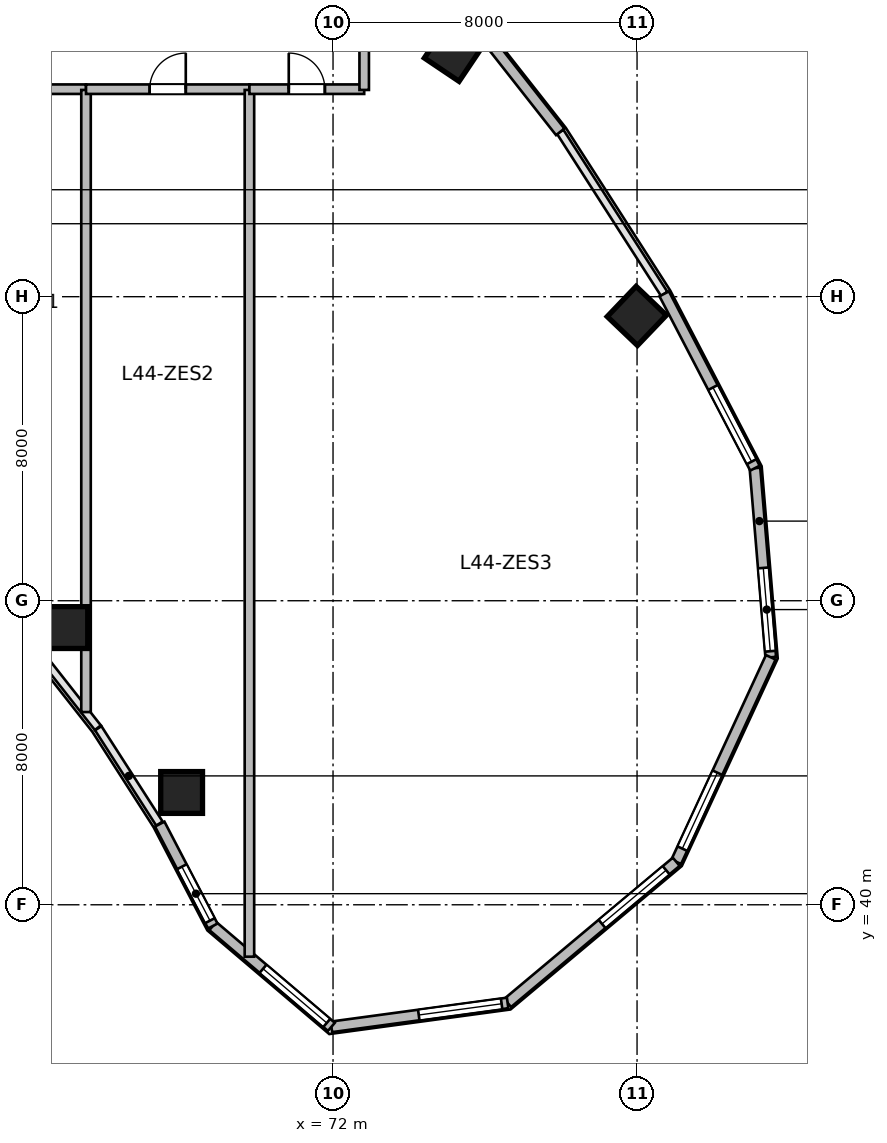
"""IFC4 building model, lengths in metres.
Left out: names, types, materials, properties, quantities, classifications, styles, units other than length and angle.
Written with IfcOpenShell. Run it as: python <this file> out.ifc"""

import sys

from ifc_helpers import new_model, si_unit, direction, frame, frame_2d, origin, origin_2d, place, context, subcontext, project, spatial, rectangle, circle, extrude, source, transform, mapped, element, fill, save


model = new_model("IFC4")
c1 = context("Model", 3, precision=1e-05, world=origin(), true_north=direction((0.0, 1.0)))
c2 = subcontext(c1, "Body", "Model", "MODEL_VIEW")
j1 = project(units=[si_unit("LENGTHUNIT", "METRE"), si_unit("PLANEANGLEUNIT", "RADIAN")], contexts=[c1])
p1 = place(None, origin())
s1 = spatial("IfcSite", under=j1, at=p1, CompositionType="ELEMENT")
p2 = place(p1, origin())
s2 = spatial("IfcBuilding", under=s1, at=p2, CompositionType="ELEMENT")
p3 = place(p2, frame((0.0, 0.0, 181.8)))
s3 = spatial("IfcBuildingStorey", under=s2, at=p3, CompositionType="ELEMENT", Elevation=181.8)
m1 = source(origin(), c2, "Body", "SweptSolid", [
    extrude(circle(Radius=0.55, at=origin_2d()), origin(), (0.0, 0.0, 1.0), 3.9),
])
p4 = place(p3, frame((64.996, 47.294, 0.0), z_axis=(0.0, 0.0, 1.0), x_axis=(0.55774510898, 0.830012285095, 0.0)))
e1 = element("IfcColumn", 1, at=p4, inside=s3, PredefinedType="COLUMN", context=c2, shape_type="MappedRepresentation", body=[
    mapped(m1, transform((0.0, 0.0, 0.0), scale=1.0)),
])
m2 = source(origin(), c2, "Body", "SweptSolid", [
    extrude(rectangle(XDim=1.1, YDim=1.1, at=origin_2d()), origin(), (0.0, 0.0, 1.0), 3.9),
])
p5 = place(p3, frame((75.167, 62.43, 0.0), z_axis=(0.0, 0.0, 1.0), x_axis=(0.55774510898, 0.830012285095, 0.0)))
e2 = element("IfcColumn", 2, at=p5, inside=s3, PredefinedType="COLUMN", context=c2, shape_type="MappedRepresentation", body=[
    mapped(m2, transform((0.0, 0.0, 0.0), scale=1.0)),
])
p6 = place(p3, frame((68.015, 42.955, 0.0), z_axis=(0.0, 0.0, 1.0), x_axis=(0.690756218984, 0.723087716626, 0.0)))
e3 = element("IfcColumn", 3, at=p6, inside=s3, PredefinedType="COLUMN", context=c2, shape_type="MappedRepresentation", body=[
    mapped(m1, transform((0.0, 0.0, 0.0), scale=1.0)),
])
p7 = place(p3, frame((79.993, 55.494, 0.0), z_axis=(0.0, 0.0, 1.0), x_axis=(0.690756218984, 0.723087716626, 0.0)))
e4 = element("IfcColumn", 4, at=p7, inside=s3, PredefinedType="COLUMN", context=c2, shape_type="MappedRepresentation", body=[
    mapped(m2, transform((0.0, 0.0, 0.0), scale=1.0)),
])
m3 = source(origin(), c2, "Body", "SweptSolid", [
    extrude(rectangle(XDim=4.994, YDim=0.28, at=frame_2d((2.497, 0.0))), origin(), (0.0, 0.0, 1.0), 3.65),
])
p8 = place(p3, frame((83.102, 51.489, 0.0), z_axis=(0.0, 0.0, 1.0), x_axis=(0.083344839916, -0.996520766296, 0.0)))
e5 = element("IfcWall", 5, at=p8, inside=s3, PredefinedType="SOLIDWALL", context=c2, shape_type="MappedRepresentation", body=[
    mapped(m3, transform((0.0, 0.0, 0.0), scale=1.0)),
])
p9 = place(p8, frame((2.635, 0.0, 0.95)))
e6 = element("IfcOpeningElement", 6, at=p9, cuts=e5, PredefinedType="OPENING", context=c2, shape_type="SweptSolid", body=[
    extrude(rectangle(XDim=2.2, YDim=2.1, at=frame_2d((1.1, 1.05))), frame((0.0, 0.15, 0.0), z_axis=(0.0, -1.0, 0.0), x_axis=(1.0, 0.0, 0.0)), (0.0, 0.0, 1.0), 0.3),
])
m4 = source(origin(), c2, "Body", "SweptSolid", [
    extrude(rectangle(XDim=5.927, YDim=0.28, at=frame_2d((2.964, 0.0))), origin(), (0.0, 0.0, 1.0), 3.65),
])
p10 = place(p3, frame((83.519, 46.512, 0.0), z_axis=(0.0, 0.0, 1.0), x_axis=(-0.419656204795, -0.907683132914, 0.0)))
e7 = element("IfcWall", 7, at=p10, inside=s3, PredefinedType="SOLIDWALL", context=c2, shape_type="MappedRepresentation", body=[
    mapped(m4, transform((0.0, 0.0, 0.0), scale=1.0)),
])
p11 = place(p10, frame((3.346, 0.0, 0.95)))
e8 = element("IfcOpeningElement", 8, at=p11, cuts=e7, PredefinedType="OPENING", context=c2, shape_type="SweptSolid", body=[
    extrude(rectangle(XDim=2.2, YDim=2.1, at=frame_2d((1.1, 1.05))), frame((0.0, 0.15, 0.0), z_axis=(0.0, -1.0, 0.0), x_axis=(1.0, 0.0, 0.0)), (0.0, 0.0, 1.0), 0.3),
])
m5 = source(origin(), c2, "Body", "SweptSolid", [
    extrude(rectangle(XDim=5.786, YDim=0.28, at=frame_2d((2.893, 0.0))), origin(), (0.0, 0.0, 1.0), 3.65),
])
p12 = place(p3, frame((81.031, 41.131, 0.0), z_axis=(0.0, 0.0, 1.0), x_axis=(-0.766711306852, -0.641992034176, 0.0)))
e9 = element("IfcWall", 9, at=p12, inside=s3, PredefinedType="SOLIDWALL", context=c2, shape_type="MappedRepresentation", body=[
    mapped(m5, transform((0.0, 0.0, 0.0), scale=1.0)),
])
p13 = place(p12, frame((0.347, 0.0, 0.95)))
e10 = element("IfcOpeningElement", 10, at=p13, cuts=e9, PredefinedType="OPENING", context=c2, shape_type="SweptSolid", body=[
    extrude(rectangle(XDim=2.2, YDim=2.1, at=frame_2d((1.1, 1.05))), frame((0.0, 0.15, 0.0), z_axis=(0.0, -1.0, 0.0), x_axis=(1.0, 0.0, 0.0)), (0.0, 0.0, 1.0), 0.3),
])
m6 = source(origin(), c2, "Body", "SweptSolid", [
    extrude(rectangle(XDim=4.68, YDim=0.28, at=frame_2d((2.34, 0.0))), origin(), (0.0, 0.0, 1.0), 3.65),
])
p14 = place(p3, frame((76.594, 37.417, 0.0), z_axis=(0.0, 0.0, 1.0), x_axis=(-0.990931146435, -0.134370618162, 0.0)))
e11 = element("IfcWall", 11, at=p14, inside=s3, PredefinedType="SOLIDWALL", context=c2, shape_type="MappedRepresentation", body=[
    mapped(m6, transform((0.0, 0.0, 0.0), scale=1.0)),
])
p15 = place(p14, frame((0.16, 0.0, 0.95)))
e12 = element("IfcOpeningElement", 12, at=p15, cuts=e11, PredefinedType="OPENING", context=c2, shape_type="SweptSolid", body=[
    extrude(rectangle(XDim=2.2, YDim=2.1, at=frame_2d((1.1, 1.05))), frame((0.0, 0.15, 0.0), z_axis=(0.0, -1.0, 0.0), x_axis=(1.0, 0.0, 0.0)), (0.0, 0.0, 1.0), 0.3),
])
m7 = source(origin(), c2, "Body", "SweptSolid", [
    extrude(rectangle(XDim=4.096, YDim=0.28, at=frame_2d((2.048, 0.0))), origin(), (0.0, 0.0, 1.0), 3.65),
])
p16 = place(p3, frame((71.957, 36.788, 0.0), z_axis=(0.0, 0.0, 1.0), x_axis=(-0.761926081737, 0.647663991564, 0.0)))
e13 = element("IfcWall", 13, at=p16, inside=s3, PredefinedType="SOLIDWALL", context=c2, shape_type="MappedRepresentation", body=[
    mapped(m7, transform((0.0, 0.0, 0.0), scale=1.0)),
])
p17 = place(p16, frame((0.16, 0.0, 0.95)))
e14 = element("IfcOpeningElement", 14, at=p17, cuts=e13, PredefinedType="OPENING", context=c2, shape_type="SweptSolid", body=[
    extrude(rectangle(XDim=2.2, YDim=2.1, at=frame_2d((1.1, 1.05))), frame((0.0, 0.15, 0.0), z_axis=(0.0, -1.0, 0.0), x_axis=(1.0, 0.0, 0.0)), (0.0, 0.0, 1.0), 0.3),
])
m8 = source(origin(), c2, "Body", "SweptSolid", [
    extrude(rectangle(XDim=3.024, YDim=0.28, at=frame_2d((1.512, 0.0))), origin(), (0.0, 0.0, 1.0), 3.65),
])
p18 = place(p3, frame((68.836, 39.44, 0.0), z_axis=(0.0, 0.0, 1.0), x_axis=(-0.461718746531, 0.887026380161, 0.0)))
e15 = element("IfcWall", 15, at=p18, inside=s3, PredefinedType="SOLIDWALL", context=c2, shape_type="MappedRepresentation", body=[
    mapped(m8, transform((0.0, 0.0, 0.0), scale=1.0)),
])
p19 = place(p18, frame((0.16, 0.0, 0.95)))
e16 = element("IfcOpeningElement", 16, at=p19, cuts=e15, PredefinedType="OPENING", context=c2, shape_type="SweptSolid", body=[
    extrude(rectangle(XDim=1.6, YDim=1.9, at=frame_2d((0.8, 0.95))), frame((0.0, 0.15, 0.0), z_axis=(0.0, -1.0, 0.0), x_axis=(1.0, 0.0, 0.0)), (0.0, 0.0, 1.0), 0.3),
])
m9 = source(origin(), c2, "Body", "SweptSolid", [
    extrude(rectangle(XDim=4.922, YDim=0.28, at=frame_2d((2.461, 0.0))), origin(), (0.0, 0.0, 1.0), 3.65),
])
p20 = place(p3, frame((74.936, 64.206, 0.0), z_axis=(0.0, 0.0, 1.0), x_axis=(0.61817639101, -0.786039407153, 0.0)))
e17 = element("IfcWall", 17, at=p20, inside=s3, PredefinedType="SOLIDWALL", context=c2, shape_type="MappedRepresentation", body=[
    mapped(m9, transform((0.0, 0.0, 0.0), scale=1.0)),
])
m10 = source(origin(), c2, "Body", "SweptSolid", [
    extrude(rectangle(XDim=5.171, YDim=0.28, at=frame_2d((2.585, 0.0))), origin(), (0.0, 0.0, 1.0), 3.65),
])
p21 = place(p3, frame((80.715, 56.075, 0.0), z_axis=(0.0, 0.0, 1.0), x_axis=(0.461752581363, -0.887008767491, 0.0)))
e18 = element("IfcWall", 18, at=p21, inside=s3, PredefinedType="SOLIDWALL", context=c2, shape_type="MappedRepresentation", body=[
    mapped(m10, transform((0.0, 0.0, 0.0), scale=1.0)),
])
p22 = place(p21, frame((2.778, 0.0, 0.95)))
e19 = element("IfcOpeningElement", 19, at=p22, cuts=e18, PredefinedType="OPENING", context=c2, shape_type="SweptSolid", body=[
    extrude(rectangle(XDim=2.2, YDim=2.1, at=frame_2d((1.1, 1.05))), frame((0.0, 0.15, 0.0), z_axis=(0.0, -1.0, 0.0), x_axis=(1.0, 0.0, 0.0)), (0.0, 0.0, 1.0), 0.3),
])
m11 = source(origin(), c2, "Body", "SweptSolid", [
    extrude(rectangle(XDim=3.9, YDim=0.25, at=frame_2d((1.95, 0.0))), origin(), (0.0, 0.0, 1.0), 3.65),
])
p23 = place(p3, frame((61.6, 61.46, 0.0), z_axis=(0.0, 0.0, 1.0), x_axis=(1.0, 0.0, 0.0)))
e20 = element("IfcWall", 20, at=p23, inside=s3, PredefinedType="PARTITIONING", context=c2, shape_type="MappedRepresentation", body=[
    mapped(m11, transform((0.0, 0.0, 0.0), scale=1.0)),
])
p24 = place(p23, frame((1.475, 0.0, 0.0)))
e21 = element("IfcOpeningElement", 21, at=p24, cuts=e20, PredefinedType="OPENING", context=c2, shape_type="SweptSolid", body=[
    extrude(rectangle(XDim=0.95, YDim=2.1, at=frame_2d((0.475, 1.05))), frame((0.0, 0.135, 0.0), z_axis=(0.0, -1.0, 0.0), x_axis=(1.0, 0.0, 0.0)), (0.0, 0.0, 1.0), 0.27),
])
m12 = source(origin(), c2, "Body", "SweptSolid", [
    extrude(rectangle(XDim=16.369, YDim=0.25, at=frame_2d((8.185, 0.0))), origin(), (0.0, 0.0, 1.0), 2.942),
])
p25 = place(p3, frame((65.5, 45.071, 0.0), z_axis=(0.0, 0.0, 1.0), x_axis=(0.0, 1.0, 0.0)))
e22 = element("IfcWall", 22, at=p25, inside=s3, PredefinedType="PARTITIONING", context=c2, shape_type="MappedRepresentation", body=[
    mapped(m12, transform((0.0, 0.0, 0.0), scale=1.0)),
])
m13 = source(origin(), c2, "Body", "SweptSolid", [
    extrude(rectangle(XDim=4.3, YDim=0.25, at=frame_2d((2.15, 0.0))), origin(), (0.0, 0.0, 1.0), 3.65),
])
p26 = place(p3, frame((65.5, 61.46, 0.0), z_axis=(0.0, 0.0, 1.0), x_axis=(1.0, 0.0, 0.0)))
e23 = element("IfcWall", 23, at=p26, inside=s3, PredefinedType="PARTITIONING", context=c2, shape_type="MappedRepresentation", body=[
    mapped(m13, transform((0.0, 0.0, 0.0), scale=1.0)),
])
p27 = place(p26, frame((1.675, 0.0, 0.0)))
e24 = element("IfcOpeningElement", 24, at=p27, cuts=e23, PredefinedType="OPENING", context=c2, shape_type="SweptSolid", body=[
    extrude(rectangle(XDim=0.95, YDim=2.1, at=frame_2d((0.475, 1.05))), frame((0.0, 0.135, 0.0), z_axis=(0.0, -1.0, 0.0), x_axis=(1.0, 0.0, 0.0)), (0.0, 0.0, 1.0), 0.27),
])
m14 = source(origin(), c2, "Body", "SweptSolid", [
    extrude(rectangle(XDim=22.806, YDim=0.25, at=frame_2d((11.403, 0.0))), origin(), (0.0, 0.0, 1.0), 2.942),
])
p28 = place(p3, frame((69.8, 38.634, 0.0), z_axis=(0.0, 0.0, 1.0), x_axis=(0.0, 1.0, 0.0)))
e25 = element("IfcWall", 25, at=p28, inside=s3, PredefinedType="PARTITIONING", context=c2, shape_type="MappedRepresentation", body=[
    mapped(m14, transform((0.0, 0.0, 0.0), scale=1.0)),
])
m15 = source(origin(), c2, "Body", "SweptSolid", [
    extrude(rectangle(XDim=3.02, YDim=0.25, at=frame_2d((1.51, 0.0))), origin(), (0.0, 0.0, 1.0), 3.65),
])
p29 = place(p3, frame((69.8, 61.46, 0.0), z_axis=(0.0, 0.0, 1.0), x_axis=(1.0, 0.0, 0.0)))
e26 = element("IfcWall", 26, at=p29, inside=s3, PredefinedType="PARTITIONING", context=c2, shape_type="MappedRepresentation", body=[
    mapped(m15, transform((0.0, 0.0, 0.0), scale=1.0)),
])
p30 = place(p29, frame((1.035, 0.0, 0.0)))
e27 = element("IfcOpeningElement", 27, at=p30, cuts=e26, PredefinedType="OPENING", context=c2, shape_type="SweptSolid", body=[
    extrude(rectangle(XDim=0.95, YDim=2.1, at=frame_2d((0.475, 1.05))), frame((0.0, 0.135, 0.0), z_axis=(0.0, -1.0, 0.0), x_axis=(1.0, 0.0, 0.0)), (0.0, 0.0, 1.0), 0.27),
])
m16 = source(origin(), c2, "Body", "SweptSolid", [
    extrude(rectangle(XDim=2.62, YDim=0.25, at=frame_2d((1.31, 0.0))), origin(), (0.0, 0.0, 1.0), 3.093),
])
p31 = place(p3, frame((72.82, 61.44, 0.0), z_axis=(0.0, 0.0, 1.0), x_axis=(0.0, 1.0, 0.0)))
e28 = element("IfcWall", 28, at=p31, inside=s3, PredefinedType="PARTITIONING", context=c2, shape_type="MappedRepresentation", body=[
    mapped(m16, transform((0.0, 0.0, 0.0), scale=1.0)),
])
m17 = source(origin(), c2, "Body", "SweptSolid", [
    extrude(rectangle(XDim=2.2, YDim=2.1, at=frame_2d((1.1, 1.05))), frame((0.0, 0.03, 0.0), z_axis=(0.0, -1.0, 0.0), x_axis=(1.0, 0.0, 0.0)), (0.0, 0.0, 1.0), 0.06),
])
p32 = place(p9, origin())
e29 = element("IfcWindow", 29, at=p32, inside=s3, PartitioningType="TRIPLE_PANEL_VERTICAL", PredefinedType="WINDOW", context=c2, shape_type="MappedRepresentation", body=[
    mapped(m17, transform((0.0, 0.0, 0.0), scale=1.0)),
])
fill(e6, e29)
p33 = place(p11, origin())
e30 = element("IfcWindow", 30, at=p33, inside=s3, PartitioningType="TRIPLE_PANEL_VERTICAL", PredefinedType="WINDOW", context=c2, shape_type="MappedRepresentation", body=[
    mapped(m17, transform((0.0, 0.0, 0.0), scale=1.0)),
])
fill(e8, e30)
p34 = place(p13, origin())
e31 = element("IfcWindow", 31, at=p34, inside=s3, PartitioningType="TRIPLE_PANEL_VERTICAL", PredefinedType="WINDOW", context=c2, shape_type="MappedRepresentation", body=[
    mapped(m17, transform((0.0, 0.0, 0.0), scale=1.0)),
])
fill(e10, e31)
p35 = place(p15, origin())
e32 = element("IfcWindow", 32, at=p35, inside=s3, PartitioningType="TRIPLE_PANEL_VERTICAL", PredefinedType="WINDOW", context=c2, shape_type="MappedRepresentation", body=[
    mapped(m17, transform((0.0, 0.0, 0.0), scale=1.0)),
])
fill(e12, e32)
p36 = place(p17, origin())
e33 = element("IfcWindow", 33, at=p36, inside=s3, PartitioningType="TRIPLE_PANEL_VERTICAL", PredefinedType="WINDOW", context=c2, shape_type="MappedRepresentation", body=[
    mapped(m17, transform((0.0, 0.0, 0.0), scale=1.0)),
])
fill(e14, e33)
m18 = source(origin(), c2, "Body", "SweptSolid", [
    extrude(rectangle(XDim=1.6, YDim=1.9, at=frame_2d((0.8, 0.95))), frame((0.0, 0.03, 0.0), z_axis=(0.0, -1.0, 0.0), x_axis=(1.0, 0.0, 0.0)), (0.0, 0.0, 1.0), 0.06),
])
p37 = place(p19, origin())
e34 = element("IfcWindow", 34, at=p37, inside=s3, PartitioningType="SINGLE_PANEL", PredefinedType="WINDOW", context=c2, shape_type="MappedRepresentation", body=[
    mapped(m18, transform((0.0, 0.0, 0.0), scale=1.0)),
])
fill(e16, e34)
p38 = place(p22, origin())
e35 = element("IfcWindow", 35, at=p38, inside=s3, PartitioningType="TRIPLE_PANEL_VERTICAL", PredefinedType="WINDOW", context=c2, shape_type="MappedRepresentation", body=[
    mapped(m17, transform((0.0, 0.0, 0.0), scale=1.0)),
])
fill(e19, e35)
m19 = source(origin(), c2, "Body", "SweptSolid", [
    extrude(rectangle(XDim=0.95, YDim=2.1, at=frame_2d((0.475, 1.05))), frame((0.0, 0.025, 0.0), z_axis=(0.0, -1.0, 0.0), x_axis=(1.0, 0.0, 0.0)), (0.0, 0.0, 1.0), 0.05),
])
p39 = place(p27, origin())
e36 = element("IfcDoor", 36, at=p39, inside=s3, OperationType="SINGLE_SWING_RIGHT", PredefinedType="DOOR", context=c2, shape_type="MappedRepresentation", body=[
    mapped(m19, transform((0.0, 0.0, 0.0), scale=1.0)),
])
fill(e24, e36)
p40 = place(p30, origin())
e37 = element("IfcDoor", 37, at=p40, inside=s3, OperationType="SINGLE_SWING_LEFT", PredefinedType="DOOR", context=c2, shape_type="MappedRepresentation", body=[
    mapped(m19, transform((0.0, 0.0, 0.0), scale=1.0)),
])
fill(e27, e37)
save(model, sys.argv[1])
